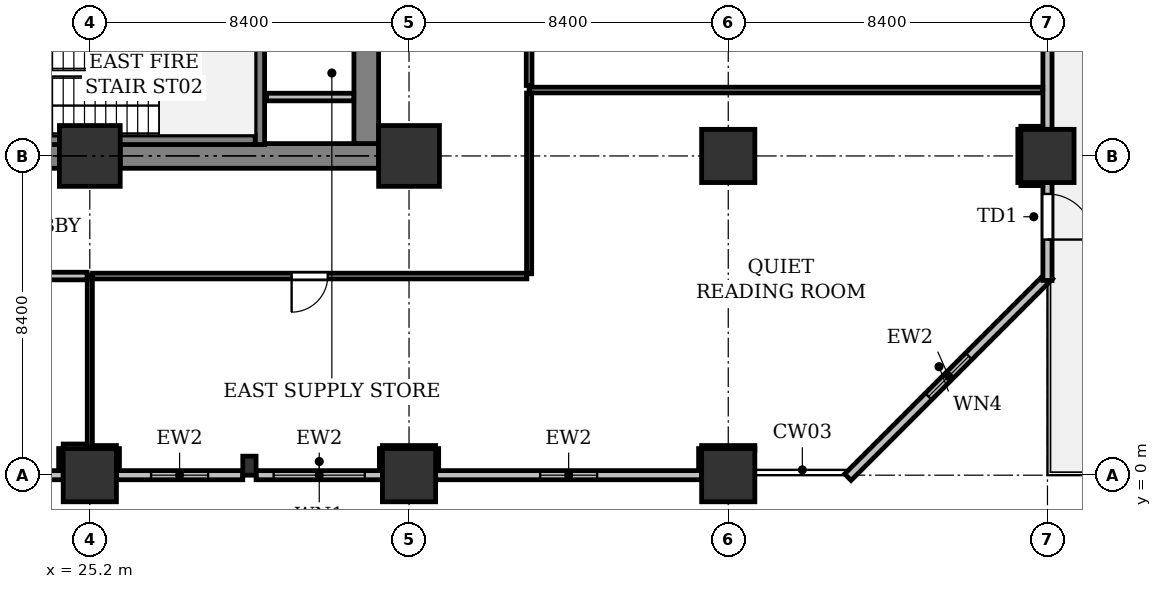
"""IFC4 building model, lengths in metres.
Left out: names, types, materials, properties, quantities, classifications, styles, units other than length and angle.
Written with IfcOpenShell. Run it as: python <this file> out.ifc"""

import sys

from ifc_helpers import new_model, si_unit, direction, frame, frame_2d, origin, origin_2d, place, context, subcontext, project, spatial, rectangle, extrude, element, fill, save


model = new_model("IFC4")
c1 = context("Model", 3, precision=1e-05, world=origin(), true_north=direction((0.0, 1.0)))
c2 = subcontext(c1, "Body", "Model", "MODEL_VIEW")
j1 = project(units=[si_unit("LENGTHUNIT", "METRE"), si_unit("PLANEANGLEUNIT", "RADIAN")], contexts=[c1])
p1 = place(None, origin())
s1 = spatial("IfcSite", under=j1, at=p1, CompositionType="ELEMENT")
p2 = place(p1, origin())
s2 = spatial("IfcBuilding", under=s1, at=p2, CompositionType="ELEMENT")
p3 = place(p2, frame((0.0, 0.0, 19.8)))
s3 = spatial("IfcBuildingStorey", under=s2, at=p3, CompositionType="ELEMENT", Elevation=19.8)
p4 = place(p3, frame((25.2, 0.0, 0.0), z_axis=(0.0, 0.0, 1.0), x_axis=(1.0, 0.0, 0.0)))
e1 = element("IfcColumn", 1, at=p4, inside=s3, PredefinedType="COLUMN", context=c2, shape_type="SweptSolid", body=[
    extrude(rectangle(XDim=1.4, YDim=1.4, at=origin_2d()), origin(), (0.0, 0.0, 1.0), 5.0),
])
p5 = place(p3, frame((25.2, 8.4, 0.0), z_axis=(0.0, 0.0, 1.0), x_axis=(1.0, 0.0, 0.0)))
e2 = element("IfcColumn", 2, at=p5, inside=s3, PredefinedType="COLUMN", context=c2, shape_type="SweptSolid", body=[
    extrude(rectangle(XDim=1.6, YDim=1.6, at=origin_2d()), origin(), (0.0, 0.0, 1.0), 5.0),
])
p6 = place(p3, frame((33.6, 0.0, 0.0), z_axis=(0.0, 0.0, 1.0), x_axis=(1.0, 0.0, 0.0)))
e3 = element("IfcColumn", 3, at=p6, inside=s3, PredefinedType="COLUMN", context=c2, shape_type="SweptSolid", body=[
    extrude(rectangle(XDim=1.4, YDim=1.4, at=origin_2d()), origin(), (0.0, 0.0, 1.0), 5.0),
])
p7 = place(p3, frame((33.6, 8.4, 0.0), z_axis=(0.0, 0.0, 1.0), x_axis=(1.0, 0.0, 0.0)))
e4 = element("IfcColumn", 4, at=p7, inside=s3, PredefinedType="COLUMN", context=c2, shape_type="SweptSolid", body=[
    extrude(rectangle(XDim=1.6, YDim=1.6, at=origin_2d()), origin(), (0.0, 0.0, 1.0), 5.0),
])
for number, where, z_axis, x_axis in (
    (5, (42.0, 0.0, 0.0), (0.0, 0.0, 1.0), (1.0, 0.0, 0.0)),
    (6, (42.0, 8.4, 0.0), (0.0, 0.0, 1.0), (1.0, 0.0, 0.0)),
    (7, (50.4, 8.4, 0.0), (0.0, 0.0, 1.0), (1.0, 0.0, 0.0)),
):
    element("IfcColumn", number, at=place(p3, frame(where, z_axis=z_axis, x_axis=x_axis)), inside=s3, PredefinedType="COLUMN", context=c2, shape_type="SweptSolid", body=[
        extrude(rectangle(XDim=1.4, YDim=1.4, at=origin_2d()), origin(), (0.0, 0.0, 1.0), 5.0),
    ])
p8 = place(p3, frame((29.4, 0.25, 0.0), z_axis=(0.0, 0.0, 1.0), x_axis=(1.0, 0.0, 0.0)))
e8 = element("IfcColumn", 8, at=p8, inside=s3, PredefinedType="PILASTER", context=c2, shape_type="SweptSolid", body=[
    extrude(rectangle(XDim=0.35, YDim=0.5, at=origin_2d()), origin(), (0.0, 0.0, 1.0), 5.0),
])
p9 = place(p3, frame((50.453, 5.253, 0.0), z_axis=(0.0, 0.0, 1.0), x_axis=(-0.707123050166, -0.707090511833, 0.0)))
e9 = element("IfcWall", 9, at=p9, inside=s3, PredefinedType="STANDARD", context=c2, shape_type="SweptSolid", body=[
    extrude(rectangle(XDim=7.503, YDim=0.24, at=frame_2d((3.751, 0.0))), origin(), (0.0, 0.0, 1.0), 4.725),
])
p10 = place(p9, frame((3.002, 0.0, 0.9)))
e10 = element("IfcOpeningElement", 10, at=p10, cuts=e9, PredefinedType="OPENING", context=c2, shape_type="SweptSolid", body=[
    extrude(rectangle(XDim=1.5, YDim=1.6, at=frame_2d((0.75, 0.8))), frame((0.0, 0.13, 0.0), z_axis=(0.0, -1.0, 0.0), x_axis=(1.0, 0.0, 0.0)), (0.0, 0.0, 1.0), 0.26),
])
p11 = place(p3, frame((41.3, 0.0, 0.0), z_axis=(0.0, 0.0, 1.0), x_axis=(-1.0, 0.0, 0.0)))
e11 = element("IfcWall", 11, at=p11, inside=s3, PredefinedType="STANDARD", context=c2, shape_type="SweptSolid", body=[
    extrude(rectangle(XDim=7.0, YDim=0.24, at=frame_2d((3.5, 0.0))), origin(), (0.0, 0.0, 1.0), 3.925),
])
p12 = place(p11, frame((2.75, 0.0, 0.9)))
e12 = element("IfcOpeningElement", 12, at=p12, cuts=e11, PredefinedType="OPENING", context=c2, shape_type="SweptSolid", body=[
    extrude(rectangle(XDim=1.5, YDim=1.6, at=frame_2d((0.75, 0.8))), frame((0.0, 0.13, 0.0), z_axis=(0.0, -1.0, 0.0), x_axis=(1.0, 0.0, 0.0)), (0.0, 0.0, 1.0), 0.26),
])
p13 = place(p3, frame((32.9, 0.0, 0.0), z_axis=(0.0, 0.0, 1.0), x_axis=(-1.0, 0.0, 0.0)))
e13 = element("IfcWall", 13, at=p13, inside=s3, PredefinedType="STANDARD", context=c2, shape_type="SweptSolid", body=[
    extrude(rectangle(XDim=3.325, YDim=0.24, at=frame_2d((1.663, 0.0))), origin(), (0.0, 0.0, 1.0), 3.925),
])
p14 = place(p13, frame((0.462, 0.0, 0.9)))
e14 = element("IfcOpeningElement", 14, at=p14, cuts=e13, PredefinedType="OPENING", context=c2, shape_type="SweptSolid", body=[
    extrude(rectangle(XDim=2.4, YDim=1.8, at=frame_2d((1.2, 0.9))), frame((0.0, 0.13, 0.0), z_axis=(0.0, -1.0, 0.0), x_axis=(1.0, 0.0, 0.0)), (0.0, 0.0, 1.0), 0.26),
])
p15 = place(p3, frame((29.225, 0.0, 0.0), z_axis=(0.0, 0.0, 1.0), x_axis=(-1.0, 0.0, 0.0)))
e15 = element("IfcWall", 15, at=p15, inside=s3, PredefinedType="STANDARD", context=c2, shape_type="SweptSolid", body=[
    extrude(rectangle(XDim=3.325, YDim=0.24, at=frame_2d((1.663, 0.0))), origin(), (0.0, 0.0, 1.0), 3.925),
])
p16 = place(p15, frame((0.913, 0.0, 0.9)))
e16 = element("IfcOpeningElement", 16, at=p16, cuts=e15, PredefinedType="OPENING", context=c2, shape_type="SweptSolid", body=[
    extrude(rectangle(XDim=1.5, YDim=1.6, at=frame_2d((0.75, 0.8))), frame((0.0, 0.13, 0.0), z_axis=(0.0, -1.0, 0.0), x_axis=(1.0, 0.0, 0.0)), (0.0, 0.0, 1.0), 0.26),
])
p17 = place(p3, frame((24.5, 0.0, 0.0), z_axis=(0.0, 0.0, 1.0), x_axis=(-1.0, 0.0, 0.0)))
e17 = element("IfcWall", 17, at=p17, inside=s3, PredefinedType="STANDARD", context=c2, shape_type="SweptSolid", body=[
    extrude(rectangle(XDim=3.325, YDim=0.24, at=frame_2d((1.663, 0.0))), origin(), (0.0, 0.0, 1.0), 3.925),
])
p18 = place(p17, frame((0.462, 0.0, 0.9)))
e18 = element("IfcOpeningElement", 18, at=p18, cuts=e17, PredefinedType="OPENING", context=c2, shape_type="SweptSolid", body=[
    extrude(rectangle(XDim=2.4, YDim=1.8, at=frame_2d((1.2, 0.9))), frame((0.0, 0.13, 0.0), z_axis=(0.0, -1.0, 0.0), x_axis=(1.0, 0.0, 0.0)), (0.0, 0.0, 1.0), 0.26),
])
p19 = place(p3, frame((50.4, 16.1, 0.0), z_axis=(0.0, 0.0, 1.0), x_axis=(0.0, -1.0, 0.0)))
e19 = element("IfcWall", 19, at=p19, inside=s3, PredefinedType="STANDARD", context=c2, shape_type="SweptSolid", body=[
    extrude(rectangle(XDim=7.0, YDim=0.24, at=frame_2d((3.5, 0.0))), origin(), (0.0, 0.0, 1.0), 4.113),
])
p20 = place(p19, frame((0.3, 0.0, 0.0)))
e20 = element("IfcOpeningElement", 20, at=p20, cuts=e19, PredefinedType="OPENING", context=c2, shape_type="SweptSolid", body=[
    extrude(rectangle(XDim=1.2, YDim=2.2, at=frame_2d((0.6, 1.1))), frame((0.0, 0.13, 0.0), z_axis=(0.0, -1.0, 0.0), x_axis=(1.0, 0.0, 0.0)), (0.0, 0.0, 1.0), 0.26),
])
p21 = place(p19, frame((2.068, 0.0, 0.9)))
e21 = element("IfcOpeningElement", 21, at=p21, cuts=e19, PredefinedType="OPENING", context=c2, shape_type="SweptSolid", body=[
    extrude(rectangle(XDim=1.8, YDim=1.6, at=frame_2d((0.9, 0.8))), frame((0.0, 0.13, 0.0), z_axis=(0.0, -1.0, 0.0), x_axis=(1.0, 0.0, 0.0)), (0.0, 0.0, 1.0), 0.26),
])
p22 = place(p3, frame((50.4, 7.7, 0.0), z_axis=(0.0, 0.0, 1.0), x_axis=(0.0, -1.0, 0.0)))
e22 = element("IfcWall", 22, at=p22, inside=s3, PredefinedType="STANDARD", context=c2, shape_type="SweptSolid", body=[
    extrude(rectangle(XDim=2.575, YDim=0.24, at=frame_2d((1.287, 0.0))), origin(), (0.0, 0.0, 1.0), 4.725),
])
p23 = place(p22, frame((0.3, 0.0, 0.0)))
e23 = element("IfcOpeningElement", 23, at=p23, cuts=e22, PredefinedType="OPENING", context=c2, shape_type="SweptSolid", body=[
    extrude(rectangle(XDim=1.2, YDim=2.2, at=frame_2d((0.6, 1.1))), frame((0.0, 0.13, 0.0), z_axis=(0.0, -1.0, 0.0), x_axis=(1.0, 0.0, 0.0)), (0.0, 0.0, 1.0), 0.26),
])
p24 = place(p3, frame((17.6, 8.4, 0.0), z_axis=(0.0, 0.0, 1.0), x_axis=(1.0, 0.0, 0.0)))
e24 = element("IfcWall", 24, at=p24, inside=s3, PredefinedType="SHEAR", context=c2, shape_type="SweptSolid", body=[
    extrude(rectangle(XDim=6.8, YDim=0.65, at=frame_2d((3.4, 0.0))), origin(), (0.0, 0.0, 1.0), 4.725),
])
p25 = place(p3, frame((26.0, 8.4, 0.0), z_axis=(0.0, 0.0, 1.0), x_axis=(1.0, 0.0, 0.0)))
e25 = element("IfcWall", 25, at=p25, inside=s3, PredefinedType="SHEAR", context=c2, shape_type="SweptSolid", body=[
    extrude(rectangle(XDim=6.8, YDim=0.65, at=frame_2d((3.4, 0.0))), origin(), (0.0, 0.0, 1.0), 4.725),
])
p26 = place(p3, frame((32.475, 8.725, 0.0), z_axis=(0.0, 0.0, 1.0), x_axis=(0.0, 1.0, 0.0)))
e26 = element("IfcWall", 26, at=p26, inside=s3, PredefinedType="SHEAR", context=c2, shape_type="SweptSolid", body=[
    extrude(rectangle(XDim=7.75, YDim=0.65, at=frame_2d((3.875, 0.0))), origin(), (0.0, 0.0, 1.0), 4.725),
])
p27 = place(p26, frame((3.975, 0.0, 0.0)))
e27 = element("IfcOpeningElement", 27, at=p27, cuts=e26, PredefinedType="OPENING", context=c2, shape_type="SweptSolid", body=[
    extrude(rectangle(XDim=1.1, YDim=2.15, at=frame_2d((0.55, 1.075))), frame((0.0, 0.335, 0.0), z_axis=(0.0, -1.0, 0.0), x_axis=(1.0, 0.0, 0.0)), (0.0, 0.0, 1.0), 0.67),
])
p28 = place(p3, frame((29.675, 8.7, 0.0), z_axis=(0.0, 0.0, 1.0), x_axis=(0.0, 1.0, 0.0)))
e28 = element("IfcWall", 28, at=p28, inside=s3, PredefinedType="SHEAR", context=c2, shape_type="SweptSolid", body=[
    extrude(rectangle(XDim=3.75, YDim=0.25, at=frame_2d((1.875, 0.0))), origin(), (0.0, 0.0, 1.0), 4.725),
])
p29 = place(p3, frame((21.8, 8.825, 0.0), z_axis=(0.0, 0.0, 1.0), x_axis=(1.0, 0.0, 0.0)))
e29 = element("IfcWall", 29, at=p29, inside=s3, PredefinedType="SHEAR", context=c2, shape_type="SweptSolid", body=[
    extrude(rectangle(XDim=7.75, YDim=0.25, at=frame_2d((3.875, 0.0))), origin(), (0.0, 0.0, 1.0), 4.725),
])
p30 = place(p3, frame((29.85, 9.95, 0.0), z_axis=(0.0, 0.0, 1.0), x_axis=(1.0, 0.0, 0.0)))
e30 = element("IfcWall", 30, at=p30, inside=s3, PredefinedType="PARTITIONING", context=c2, shape_type="SweptSolid", body=[
    extrude(rectangle(XDim=2.296, YDim=0.2, at=frame_2d((1.148, 0.0))), origin(), (0.0, 0.0, 1.0), 4.725),
])
p31 = place(p3, frame((25.2, 5.24, 0.0), z_axis=(0.0, 0.0, 1.0), x_axis=(0.0, -1.0, 0.0)))
e31 = element("IfcWall", 31, at=p31, inside=s3, PredefinedType="PARTITIONING", context=c2, shape_type="SweptSolid", body=[
    extrude(rectangle(XDim=4.52, YDim=0.135, at=frame_2d((2.26, 0.0))), origin(), (0.0, 0.0, 1.0), 4.113),
])
p32 = place(p3, frame((25.271, 0.72, 0.0), z_axis=(0.0, 0.0, 1.0), x_axis=(1.0, 0.0, 0.0)))
e32 = element("IfcWall", 32, at=p32, inside=s3, PredefinedType="PARTITIONING", context=c2, shape_type="SweptSolid", body=[
    extrude(rectangle(XDim=0.628, YDim=0.12, at=frame_2d((0.314, 0.0))), origin(), (0.0, 0.0, 1.0), 4.113),
])
for number, where, z_axis, x_axis in (
    (33, (25.92, 0.7, 0.0), (0.0, 0.0, 1.0), (0.0, -1.0, 0.0)),
    (34, (32.88, 0.124, 0.0), (0.0, 0.0, 1.0), (0.0, 1.0, 0.0)),
):
    element("IfcWall", number, at=place(p3, frame(where, z_axis=z_axis, x_axis=x_axis)), inside=s3, PredefinedType="PARTITIONING", context=c2, shape_type="SweptSolid", body=[
        extrude(rectangle(XDim=0.576, YDim=0.12, at=frame_2d((0.288, 0.0))), origin(), (0.0, 0.0, 1.0), 4.725),
    ])
p33 = place(p3, frame((32.9, 0.72, 0.0), z_axis=(0.0, 0.0, 1.0), x_axis=(1.0, 0.0, 0.0)))
e35 = element("IfcWall", 35, at=p33, inside=s3, PredefinedType="PARTITIONING", context=c2, shape_type="SweptSolid", body=[
    extrude(rectangle(XDim=1.4, YDim=0.12, at=frame_2d((0.7, 0.0))), origin(), (0.0, 0.0, 1.0), 4.113),
])
for number, where, z_axis, x_axis in (
    (36, (34.32, 0.7, 0.0), (0.0, 0.0, 1.0), (0.0, -1.0, 0.0)),
    (37, (41.28, 0.124, 0.0), (0.0, 0.0, 1.0), (0.0, 1.0, 0.0)),
):
    element("IfcWall", number, at=place(p3, frame(where, z_axis=z_axis, x_axis=x_axis)), inside=s3, PredefinedType="PARTITIONING", context=c2, shape_type="SweptSolid", body=[
        extrude(rectangle(XDim=0.576, YDim=0.12, at=frame_2d((0.288, 0.0))), origin(), (0.0, 0.0, 1.0), 4.725),
    ])
p34 = place(p3, frame((41.3, 0.72, 0.0), z_axis=(0.0, 0.0, 1.0), x_axis=(1.0, 0.0, 0.0)))
e38 = element("IfcWall", 38, at=p34, inside=s3, PredefinedType="PARTITIONING", context=c2, shape_type="SweptSolid", body=[
    extrude(rectangle(XDim=1.4, YDim=0.12, at=frame_2d((0.7, 0.0))), origin(), (0.0, 0.0, 1.0), 4.113),
])
p35 = place(p3, frame((50.276, 7.68, 0.0), z_axis=(0.0, 0.0, 1.0), x_axis=(-1.0, 0.0, 0.0)))
e39 = element("IfcWall", 39, at=p35, inside=s3, PredefinedType="PARTITIONING", context=c2, shape_type="SweptSolid", body=[
    extrude(rectangle(XDim=0.576, YDim=0.12, at=frame_2d((0.288, 0.0))), origin(), (0.0, 0.0, 1.0), 4.725),
])
p36 = place(p3, frame((49.68, 7.7, 0.0), z_axis=(0.0, 0.0, 1.0), x_axis=(0.0, 1.0, 0.0)))
e40 = element("IfcWall", 40, at=p36, inside=s3, PredefinedType="PARTITIONING", context=c2, shape_type="SweptSolid", body=[
    extrude(rectangle(XDim=1.4, YDim=0.12, at=frame_2d((0.7, 0.0))), origin(), (0.0, 0.0, 1.0), 3.925),
])
p37 = place(p3, frame((49.7, 9.12, 0.0), z_axis=(0.0, 0.0, 1.0), x_axis=(1.0, 0.0, 0.0)))
e41 = element("IfcWall", 41, at=p37, inside=s3, PredefinedType="PARTITIONING", context=c2, shape_type="SweptSolid", body=[
    extrude(rectangle(XDim=0.576, YDim=0.12, at=frame_2d((0.288, 0.0))), origin(), (0.0, 0.0, 1.0), 4.725),
])
p38 = place(p3, frame((50.276, 10.134, 0.0), z_axis=(0.0, 0.0, 1.0), x_axis=(-1.0, 0.0, 0.0)))
e42 = element("IfcWall", 42, at=p38, inside=s3, PredefinedType="PARTITIONING", context=c2, shape_type="SweptSolid", body=[
    extrude(rectangle(XDim=13.516, YDim=0.15, at=frame_2d((6.758, 0.0))), origin(), (0.0, 0.0, 1.0), 4.113),
])
p39 = place(p3, frame((36.76, 10.055, 0.0), z_axis=(0.0, 0.0, 1.0), x_axis=(0.0, -1.0, 0.0)))
e43 = element("IfcWall", 43, at=p39, inside=s3, PredefinedType="PARTITIONING", context=c2, shape_type="SweptSolid", body=[
    extrude(rectangle(XDim=4.755, YDim=0.135, at=frame_2d((2.377, 0.0))), origin(), (0.0, 0.0, 1.0), 3.925),
])
p40 = place(p3, frame((36.7, 5.24, 0.0), z_axis=(0.0, 0.0, 1.0), x_axis=(-1.0, 0.0, 0.0)))
e44 = element("IfcWall", 44, at=p40, inside=s3, PredefinedType="PARTITIONING", context=c2, shape_type="SweptSolid", body=[
    extrude(rectangle(XDim=11.428, YDim=0.15, at=frame_2d((5.714, 0.0))), origin(), (0.0, 0.0, 1.0), 4.113),
])
p41 = place(p40, frame((5.239, 0.0, 0.0)))
e45 = element("IfcOpeningElement", 45, at=p41, cuts=e44, PredefinedType="OPENING", context=c2, shape_type="SweptSolid", body=[
    extrude(rectangle(XDim=0.95, YDim=2.15, at=frame_2d((0.475, 1.075))), frame((0.0, 0.085, 0.0), z_axis=(0.0, -1.0, 0.0), x_axis=(1.0, 0.0, 0.0)), (0.0, 0.0, 1.0), 0.17),
])
p42 = place(p3, frame((36.76, 17.546, 0.0), z_axis=(0.0, 0.0, 1.0), x_axis=(0.0, -1.0, 0.0)))
e46 = element("IfcWall", 46, at=p42, inside=s3, PredefinedType="PARTITIONING", context=c2, shape_type="SweptSolid", body=[
    extrude(rectangle(XDim=7.292, YDim=0.15, at=frame_2d((3.646, 0.0))), origin(), (0.0, 0.0, 1.0), 3.925),
])
p43 = place(p3, frame((24.48, 0.124, 0.0), z_axis=(0.0, 0.0, 1.0), x_axis=(0.0, 1.0, 0.0)))
e47 = element("IfcWall", 47, at=p43, inside=s3, PredefinedType="PARTITIONING", context=c2, shape_type="SweptSolid", body=[
    extrude(rectangle(XDim=0.576, YDim=0.2, at=frame_2d((0.288, 0.0))), origin(), (0.0, 0.0, 1.0), 3.925),
])
p44 = place(p3, frame((24.5, 0.72, 0.0), z_axis=(0.0, 0.0, 1.0), x_axis=(1.0, 0.0, 0.0)))
e48 = element("IfcWall", 48, at=p44, inside=s3, PredefinedType="PARTITIONING", context=c2, shape_type="SweptSolid", body=[
    extrude(rectangle(XDim=0.628, YDim=0.2, at=frame_2d((0.314, 0.0))), origin(), (0.0, 0.0, 1.0), 4.113),
])
p45 = place(p3, frame((25.128, 5.24, 0.0), z_axis=(0.0, 0.0, 1.0), x_axis=(-1.0, 0.0, 0.0)))
e49 = element("IfcWall", 49, at=p45, inside=s3, PredefinedType="PARTITIONING", context=c2, shape_type="SweptSolid", body=[
    extrude(rectangle(XDim=10.979, YDim=0.2, at=frame_2d((5.489, 0.0))), origin(), (0.0, 0.0, 1.0), 4.113),
])
p46 = place(p10, origin())
e50 = element("IfcWindow", 50, at=p46, inside=s3, PartitioningType="SINGLE_PANEL", PredefinedType="WINDOW", context=c2, shape_type="SweptSolid", body=[
    extrude(rectangle(XDim=1.5, YDim=1.6, at=frame_2d((0.75, 0.8))), frame((0.0, 0.03, 0.0), z_axis=(0.0, -1.0, 0.0), x_axis=(1.0, 0.0, 0.0)), (0.0, 0.0, 1.0), 0.06),
])
fill(e10, e50)
p47 = place(p12, origin())
e51 = element("IfcWindow", 51, at=p47, inside=s3, PartitioningType="SINGLE_PANEL", PredefinedType="WINDOW", context=c2, shape_type="SweptSolid", body=[
    extrude(rectangle(XDim=1.5, YDim=1.6, at=frame_2d((0.75, 0.8))), frame((0.0, 0.03, 0.0), z_axis=(0.0, -1.0, 0.0), x_axis=(1.0, 0.0, 0.0)), (0.0, 0.0, 1.0), 0.06),
])
fill(e12, e51)
p48 = place(p14, origin())
e52 = element("IfcWindow", 52, at=p48, inside=s3, PartitioningType="SINGLE_PANEL", PredefinedType="WINDOW", context=c2, shape_type="SweptSolid", body=[
    extrude(rectangle(XDim=2.4, YDim=1.8, at=frame_2d((1.2, 0.9))), frame((0.0, 0.03, 0.0), z_axis=(0.0, -1.0, 0.0), x_axis=(1.0, 0.0, 0.0)), (0.0, 0.0, 1.0), 0.06),
])
fill(e14, e52)
p49 = place(p16, origin())
e53 = element("IfcWindow", 53, at=p49, inside=s3, PartitioningType="SINGLE_PANEL", PredefinedType="WINDOW", context=c2, shape_type="SweptSolid", body=[
    extrude(rectangle(XDim=1.5, YDim=1.6, at=frame_2d((0.75, 0.8))), frame((0.0, 0.03, 0.0), z_axis=(0.0, -1.0, 0.0), x_axis=(1.0, 0.0, 0.0)), (0.0, 0.0, 1.0), 0.06),
])
fill(e16, e53)
p50 = place(p23, origin())
e54 = element("IfcDoor", 54, at=p50, inside=s3, OperationType="SINGLE_SWING_RIGHT", PredefinedType="DOOR", context=c2, shape_type="SweptSolid", body=[
    extrude(rectangle(XDim=1.2, YDim=2.2, at=frame_2d((0.6, 1.1))), frame((0.0, 0.025, 0.0), z_axis=(0.0, -1.0, 0.0), x_axis=(1.0, 0.0, 0.0)), (0.0, 0.0, 1.0), 0.05),
])
fill(e23, e54)
p51 = place(p41, origin())
e55 = element("IfcDoor", 55, at=p51, inside=s3, OperationType="SINGLE_SWING_RIGHT", PredefinedType="DOOR", context=c2, shape_type="SweptSolid", body=[
    extrude(rectangle(XDim=0.95, YDim=2.15, at=frame_2d((0.475, 1.075))), frame((0.0, 0.025, 0.0), z_axis=(0.0, -1.0, 0.0), x_axis=(1.0, 0.0, 0.0)), (0.0, 0.0, 1.0), 0.05),
])
fill(e45, e55)
save(model, sys.argv[1])
